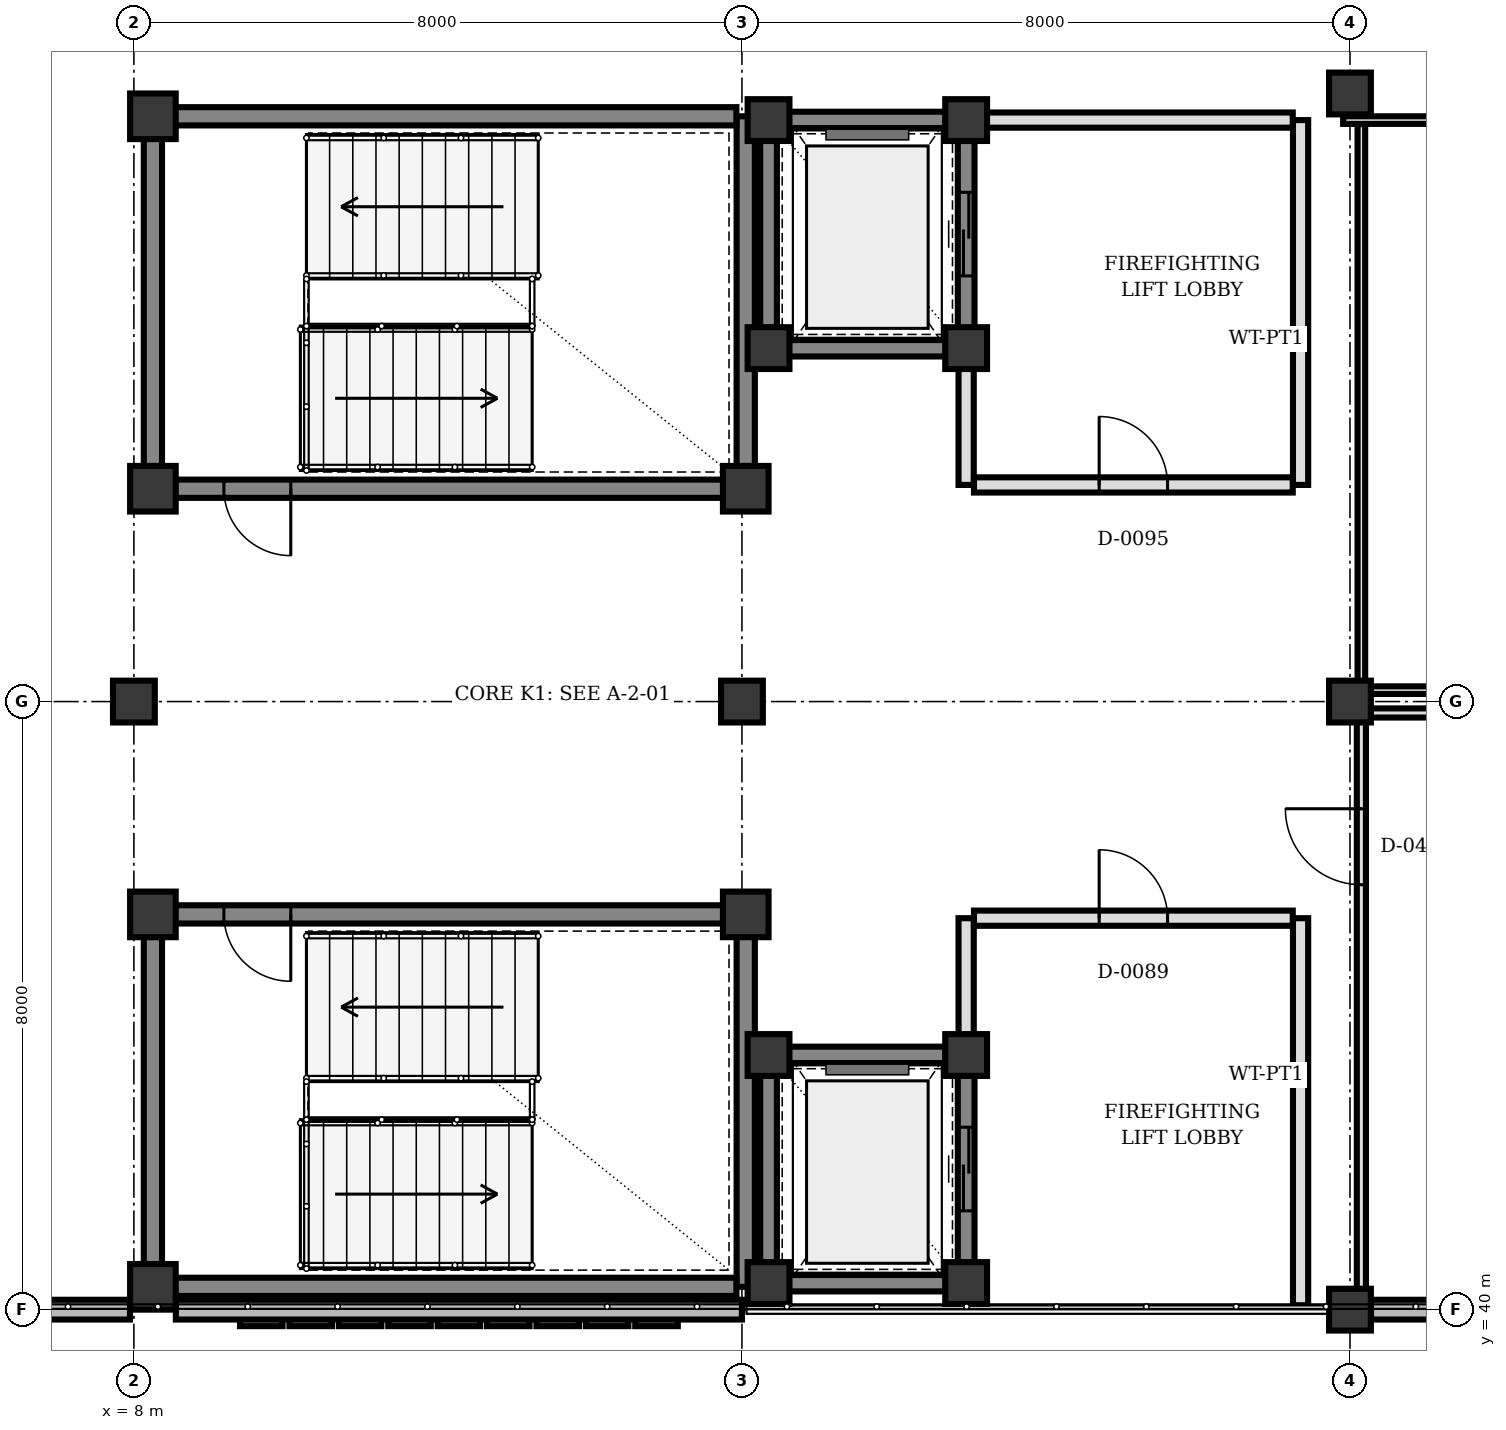
"""IFC4 building model, lengths in metres.
Left out: names, types, materials, properties, quantities, classifications, styles, units other than length and angle.
Written with IfcOpenShell. Run it as: python <this file> out.ifc"""

import sys

from ifc_helpers import new_model, si_unit, direction, frame, frame_2d, origin, origin_2d, place, context, subcontext, project, spatial, rectangle, extrude, element, fill, save


model = new_model("IFC4")
c1 = context("Model", 3, precision=1e-05, world=origin(), true_north=direction((0.0, 1.0)))
c2 = subcontext(c1, "Body", "Model", "MODEL_VIEW")
j1 = project(units=[si_unit("LENGTHUNIT", "METRE"), si_unit("PLANEANGLEUNIT", "RADIAN")], contexts=[c1])
p1 = place(None, origin())
s1 = spatial("IfcSite", under=j1, at=p1, CompositionType="ELEMENT")
p2 = place(p1, origin())
s2 = spatial("IfcBuilding", under=s1, at=p2, CompositionType="ELEMENT")
p3 = place(p2, frame((0.0, 0.0, 16.5)))
s3 = spatial("IfcBuildingStorey", under=s2, at=p3, CompositionType="ELEMENT", Elevation=16.5)
for number, where, z_axis, x_axis in (
    (1, (8.25, 40.3, 0.0), (0.0, 0.0, 1.0), (1.0, 0.0, 0.0)),
    (2, (16.05, 45.2, 0.0), (0.0, 0.0, 1.0), (1.0, 0.0, 0.0)),
    (3, (8.25, 45.2, 0.0), (0.0, 0.0, 1.0), (1.0, 0.0, 0.0)),
    (4, (8.25, 50.8, 0.0), (0.0, 0.0, 1.0), (1.0, 0.0, 0.0)),
    (5, (16.05, 50.8, 0.0), (0.0, 0.0, 1.0), (1.0, 0.0, 0.0)),
    (6, (8.25, 55.7, 0.0), (0.0, 0.0, 1.0), (1.0, 0.0, 0.0)),
):
    element("IfcColumn", number, at=place(p3, frame(where, z_axis=z_axis, x_axis=x_axis)), inside=s3, PredefinedType="COLUMN", context=c2, shape_type="SweptSolid", body=[
        extrude(rectangle(XDim=0.6, YDim=0.6, at=origin_2d()), origin(), (0.0, 0.0, 1.0), 4.0),
    ])
for number, where, z_axis, x_axis in (
    (7, (16.35, 40.35, 0.0), (0.0, 0.0, 1.0), (1.0, 0.0, 0.0)),
    (8, (18.95, 40.35, 0.0), (0.0, 0.0, 1.0), (1.0, 0.0, 0.0)),
    (9, (18.95, 43.35, 0.0), (0.0, 0.0, 1.0), (1.0, 0.0, 0.0)),
    (10, (16.35, 43.35, 0.0), (0.0, 0.0, 1.0), (1.0, 0.0, 0.0)),
    (11, (16.35, 52.65, 0.0), (0.0, 0.0, 1.0), (1.0, 0.0, 0.0)),
    (12, (18.95, 52.65, 0.0), (0.0, 0.0, 1.0), (1.0, 0.0, 0.0)),
    (13, (18.95, 55.65, 0.0), (0.0, 0.0, 1.0), (1.0, 0.0, 0.0)),
    (14, (16.35, 55.65, 0.0), (0.0, 0.0, 1.0), (1.0, 0.0, 0.0)),
    (15, (16.0, 48.0, 0.0), (0.0, 0.0, 1.0), (1.0, 0.0, 0.0)),
    (16, (24.0, 40.0, 0.0), (0.0, 0.0, 1.0), (1.0, 0.0, 0.0)),
    (17, (24.0, 48.0, 0.0), (0.0, 0.0, 1.0), (1.0, 0.0, 0.0)),
    (18, (24.0, 56.0, 0.0), (0.0, 0.0, 1.0), (1.0, 0.0, 0.0)),
    (19, (8.0, 48.0, 0.0), (0.0, 0.0, 1.0), (1.0, 0.0, 0.0)),
):
    element("IfcColumn", number, at=place(p3, frame(where, z_axis=z_axis, x_axis=x_axis)), inside=s3, PredefinedType="COLUMN", context=c2, shape_type="SweptSolid", body=[
        extrude(rectangle(XDim=0.55, YDim=0.55, at=origin_2d()), origin(), (0.0, 0.0, 1.0), 4.0),
    ])
p4 = place(p3, frame((31.723, 40.0, 0.0), z_axis=(0.0, 0.0, 1.0), x_axis=(-1.0, 0.0, 0.0)))
e20 = element("IfcWall", 20, at=p4, inside=s3, PredefinedType="SOLIDWALL", context=c2, shape_type="SweptSolid", body=[
    extrude(rectangle(XDim=7.446, YDim=0.26, at=frame_2d((3.723, 0.0))), origin(), (0.0, 0.0, 1.0), 3.068),
])
p5 = place(p4, frame((4.911, 0.0, 0.9)))
e21 = element("IfcOpeningElement", 21, at=p5, cuts=e20, PredefinedType="OPENING", context=c2, shape_type="SweptSolid", body=[
    extrude(rectangle(XDim=0.9, YDim=1.4, at=frame_2d((0.45, 0.7))), frame((0.0, 0.14, 0.0), z_axis=(0.0, -1.0, 0.0), x_axis=(1.0, 0.0, 0.0)), (0.0, 0.0, 1.0), 0.28),
])
p6 = place(p3, frame((16.0, 40.0, 0.0), z_axis=(0.0, 0.0, 1.0), x_axis=(-1.0, 0.0, 0.0)))
e22 = element("IfcWall", 22, at=p6, inside=s3, PredefinedType="SOLIDWALL", context=c2, shape_type="SweptSolid", body=[
    extrude(rectangle(XDim=7.448, YDim=0.26, at=frame_2d((3.724, 0.0))), origin(), (0.0, 0.0, 1.0), 3.55),
])
p7 = place(p3, frame((7.948, 40.0, 0.0), z_axis=(0.0, 0.0, 1.0), x_axis=(-1.0, 0.0, 0.0)))
e23 = element("IfcWall", 23, at=p7, inside=s3, PredefinedType="SOLIDWALL", context=c2, shape_type="SweptSolid", body=[
    extrude(rectangle(XDim=7.671, YDim=0.26, at=frame_2d((3.835, 0.0))), origin(), (0.0, 0.0, 1.0), 3.55),
])
p8 = place(p7, frame((1.351, 0.0, 0.9)))
e24 = element("IfcOpeningElement", 24, at=p8, cuts=e23, PredefinedType="OPENING", context=c2, shape_type="SweptSolid", body=[
    extrude(rectangle(XDim=1.9, YDim=1.1, at=frame_2d((0.95, 0.55))), frame((0.0, 0.14, 0.0), z_axis=(0.0, -1.0, 0.0), x_axis=(1.0, 0.0, 0.0)), (0.0, 0.0, 1.0), 0.28),
])
p9 = place(p3, frame((8.25, 40.592, 0.0), z_axis=(0.0, 0.0, 1.0), x_axis=(0.0, 1.0, 0.0)))
e25 = element("IfcWall", 25, at=p9, inside=s3, PredefinedType="SHEAR", context=c2, shape_type="SweptSolid", body=[
    extrude(rectangle(XDim=4.316, YDim=0.24, at=frame_2d((2.158, 0.0))), origin(), (0.0, 0.0, 1.0), 3.74),
])
p10 = place(p3, frame((16.05, 44.908, 0.0), z_axis=(0.0, 0.0, 1.0), x_axis=(0.0, -1.0, 0.0)))
e26 = element("IfcWall", 26, at=p10, inside=s3, PredefinedType="SHEAR", context=c2, shape_type="SweptSolid", body=[
    extrude(rectangle(XDim=4.608, YDim=0.24, at=frame_2d((2.304, 0.0))), origin(), (0.0, 0.0, 1.0), 3.74),
])
p11 = place(p3, frame((15.927, 40.3, 0.0), z_axis=(0.0, 0.0, 1.0), x_axis=(-1.0, 0.0, 0.0)))
e27 = element("IfcWall", 27, at=p11, inside=s3, PredefinedType="SHEAR", context=c2, shape_type="SweptSolid", body=[
    extrude(rectangle(XDim=7.385, YDim=0.24, at=frame_2d((3.692, 0.0))), origin(), (0.0, 0.0, 1.0), 3.74),
])
p12 = place(p3, frame((15.758, 45.2, 0.0), z_axis=(0.0, 0.0, 1.0), x_axis=(-1.0, 0.0, 0.0)))
e28 = element("IfcWall", 28, at=p12, inside=s3, PredefinedType="SHEAR", context=c2, shape_type="SweptSolid", body=[
    extrude(rectangle(XDim=7.216, YDim=0.24, at=frame_2d((3.608, 0.0))), origin(), (0.0, 0.0, 1.0), 3.74),
])
p13 = place(p12, frame((5.694, 0.0, 0.0)))
e29 = element("IfcOpeningElement", 29, at=p13, cuts=e28, PredefinedType="OPENING", context=c2, shape_type="SweptSolid", body=[
    extrude(rectangle(XDim=0.88, YDim=2.1, at=frame_2d((0.44, 1.05))), frame((0.0, 0.13, 0.0), z_axis=(0.0, -1.0, 0.0), x_axis=(1.0, 0.0, 0.0)), (0.0, 0.0, 1.0), 0.26),
])
p14 = place(p3, frame((8.25, 51.092, 0.0), z_axis=(0.0, 0.0, 1.0), x_axis=(0.0, 1.0, 0.0)))
e30 = element("IfcWall", 30, at=p14, inside=s3, PredefinedType="SHEAR", context=c2, shape_type="SweptSolid", body=[
    extrude(rectangle(XDim=4.316, YDim=0.24, at=frame_2d((2.158, 0.0))), origin(), (0.0, 0.0, 1.0), 3.74),
])
p15 = place(p3, frame((16.05, 55.7, 0.0), z_axis=(0.0, 0.0, 1.0), x_axis=(0.0, -1.0, 0.0)))
e31 = element("IfcWall", 31, at=p15, inside=s3, PredefinedType="SHEAR", context=c2, shape_type="SweptSolid", body=[
    extrude(rectangle(XDim=4.608, YDim=0.24, at=frame_2d((2.304, 0.0))), origin(), (0.0, 0.0, 1.0), 3.74),
])
p16 = place(p3, frame((15.758, 50.8, 0.0), z_axis=(0.0, 0.0, 1.0), x_axis=(-1.0, 0.0, 0.0)))
e32 = element("IfcWall", 32, at=p16, inside=s3, PredefinedType="SHEAR", context=c2, shape_type="SweptSolid", body=[
    extrude(rectangle(XDim=7.216, YDim=0.24, at=frame_2d((3.608, 0.0))), origin(), (0.0, 0.0, 1.0), 3.74),
])
p17 = place(p16, frame((5.694, 0.0, 0.0)))
e33 = element("IfcOpeningElement", 33, at=p17, cuts=e32, PredefinedType="OPENING", context=c2, shape_type="SweptSolid", body=[
    extrude(rectangle(XDim=0.88, YDim=2.1, at=frame_2d((0.44, 1.05))), frame((0.0, 0.13, 0.0), z_axis=(0.0, -1.0, 0.0), x_axis=(1.0, 0.0, 0.0)), (0.0, 0.0, 1.0), 0.26),
])
p18 = place(p3, frame((15.927, 55.7, 0.0), z_axis=(0.0, 0.0, 1.0), x_axis=(-1.0, 0.0, 0.0)))
e34 = element("IfcWall", 34, at=p18, inside=s3, PredefinedType="SHEAR", context=c2, shape_type="SweptSolid", body=[
    extrude(rectangle(XDim=7.385, YDim=0.24, at=frame_2d((3.692, 0.0))), origin(), (0.0, 0.0, 1.0), 3.74),
])
p19 = place(p3, frame((16.617, 40.35, 0.0), z_axis=(0.0, 0.0, 1.0), x_axis=(1.0, 0.0, 0.0)))
e35 = element("IfcWall", 35, at=p19, inside=s3, PredefinedType="SHEAR", context=c2, shape_type="SweptSolid", body=[
    extrude(rectangle(XDim=2.066, YDim=0.22, at=frame_2d((1.033, 0.0))), origin(), (0.0, 0.0, 1.0), 3.74),
])
p20 = place(p3, frame((18.95, 40.617, 0.0), z_axis=(0.0, 0.0, 1.0), x_axis=(0.0, 1.0, 0.0)))
e36 = element("IfcWall", 36, at=p20, inside=s3, PredefinedType="SHEAR", context=c2, shape_type="SweptSolid", body=[
    extrude(rectangle(XDim=2.466, YDim=0.22, at=frame_2d((1.233, 0.0))), origin(), (0.0, 0.0, 1.0), 3.74),
])
p21 = place(p20, frame((0.683, 0.0, 0.0)))
e37 = element("IfcOpeningElement", 37, at=p21, cuts=e36, PredefinedType="OPENING", context=c2, shape_type="SweptSolid", body=[
    extrude(rectangle(XDim=1.1, YDim=2.15, at=frame_2d((0.55, 1.075))), frame((0.0, 0.12, 0.0), z_axis=(0.0, -1.0, 0.0), x_axis=(1.0, 0.0, 0.0)), (0.0, 0.0, 1.0), 0.24),
])
p22 = place(p3, frame((18.683, 43.35, 0.0), z_axis=(0.0, 0.0, 1.0), x_axis=(-1.0, 0.0, 0.0)))
e38 = element("IfcWall", 38, at=p22, inside=s3, PredefinedType="SHEAR", context=c2, shape_type="SweptSolid", body=[
    extrude(rectangle(XDim=2.066, YDim=0.22, at=frame_2d((1.033, 0.0))), origin(), (0.0, 0.0, 1.0), 3.74),
])
p23 = place(p3, frame((16.35, 43.083, 0.0), z_axis=(0.0, 0.0, 1.0), x_axis=(0.0, -1.0, 0.0)))
e39 = element("IfcWall", 39, at=p23, inside=s3, PredefinedType="SHEAR", context=c2, shape_type="SweptSolid", body=[
    extrude(rectangle(XDim=2.466, YDim=0.22, at=frame_2d((1.233, 0.0))), origin(), (0.0, 0.0, 1.0), 3.74),
])
p24 = place(p3, frame((18.95, 43.617, 0.0), z_axis=(0.0, 0.0, 1.0), x_axis=(0.0, 1.0, 0.0)))
e40 = element("IfcWall", 40, at=p24, inside=s3, PredefinedType="PARTITIONING", context=c2, shape_type="SweptSolid", body=[
    extrude(rectangle(XDim=1.533, YDim=0.2, at=frame_2d((0.767, 0.0))), origin(), (0.0, 0.0, 1.0), 3.7),
])
p25 = place(p3, frame((23.35, 40.058, 0.0), z_axis=(0.0, 0.0, 1.0), x_axis=(0.0, 1.0, 0.0)))
e41 = element("IfcWall", 41, at=p25, inside=s3, PredefinedType="PARTITIONING", context=c2, shape_type="SweptSolid", body=[
    extrude(rectangle(XDim=5.092, YDim=0.2, at=frame_2d((2.546, 0.0))), origin(), (0.0, 0.0, 1.0), 3.7),
])
p26 = place(p3, frame((19.053, 45.15, 0.0), z_axis=(0.0, 0.0, 1.0), x_axis=(1.0, 0.0, 0.0)))
e42 = element("IfcWall", 42, at=p26, inside=s3, PredefinedType="PARTITIONING", context=c2, shape_type="SweptSolid", body=[
    extrude(rectangle(XDim=4.194, YDim=0.2, at=frame_2d((2.097, 0.0))), origin(), (0.0, 0.0, 1.0), 3.7),
])
p27 = place(p26, frame((1.647, 0.0, 0.0)))
e43 = element("IfcOpeningElement", 43, at=p27, cuts=e42, PredefinedType="OPENING", context=c2, shape_type="SweptSolid", body=[
    extrude(rectangle(XDim=0.9, YDim=2.2, at=frame_2d((0.45, 1.1))), frame((0.0, 0.11, 0.0), z_axis=(0.0, -1.0, 0.0), x_axis=(1.0, 0.0, 0.0)), (0.0, 0.0, 1.0), 0.22),
])
p28 = place(p3, frame((16.617, 52.65, 0.0), z_axis=(0.0, 0.0, 1.0), x_axis=(1.0, 0.0, 0.0)))
e44 = element("IfcWall", 44, at=p28, inside=s3, PredefinedType="SHEAR", context=c2, shape_type="SweptSolid", body=[
    extrude(rectangle(XDim=2.066, YDim=0.22, at=frame_2d((1.033, 0.0))), origin(), (0.0, 0.0, 1.0), 3.74),
])
p29 = place(p3, frame((18.95, 52.917, 0.0), z_axis=(0.0, 0.0, 1.0), x_axis=(0.0, 1.0, 0.0)))
e45 = element("IfcWall", 45, at=p29, inside=s3, PredefinedType="SHEAR", context=c2, shape_type="SweptSolid", body=[
    extrude(rectangle(XDim=2.466, YDim=0.22, at=frame_2d((1.233, 0.0))), origin(), (0.0, 0.0, 1.0), 3.74),
])
p30 = place(p29, frame((0.683, 0.0, 0.0)))
e46 = element("IfcOpeningElement", 46, at=p30, cuts=e45, PredefinedType="OPENING", context=c2, shape_type="SweptSolid", body=[
    extrude(rectangle(XDim=1.1, YDim=2.15, at=frame_2d((0.55, 1.075))), frame((0.0, 0.12, 0.0), z_axis=(0.0, -1.0, 0.0), x_axis=(1.0, 0.0, 0.0)), (0.0, 0.0, 1.0), 0.24),
])
p31 = place(p3, frame((18.683, 55.65, 0.0), z_axis=(0.0, 0.0, 1.0), x_axis=(-1.0, 0.0, 0.0)))
e47 = element("IfcWall", 47, at=p31, inside=s3, PredefinedType="SHEAR", context=c2, shape_type="SweptSolid", body=[
    extrude(rectangle(XDim=2.066, YDim=0.22, at=frame_2d((1.033, 0.0))), origin(), (0.0, 0.0, 1.0), 3.74),
])
p32 = place(p3, frame((16.35, 55.383, 0.0), z_axis=(0.0, 0.0, 1.0), x_axis=(0.0, -1.0, 0.0)))
e48 = element("IfcWall", 48, at=p32, inside=s3, PredefinedType="SHEAR", context=c2, shape_type="SweptSolid", body=[
    extrude(rectangle(XDim=2.466, YDim=0.22, at=frame_2d((1.233, 0.0))), origin(), (0.0, 0.0, 1.0), 3.74),
])
p33 = place(p3, frame((18.95, 50.85, 0.0), z_axis=(0.0, 0.0, 1.0), x_axis=(0.0, 1.0, 0.0)))
e49 = element("IfcWall", 49, at=p33, inside=s3, PredefinedType="PARTITIONING", context=c2, shape_type="SweptSolid", body=[
    extrude(rectangle(XDim=1.533, YDim=0.2, at=frame_2d((0.767, 0.0))), origin(), (0.0, 0.0, 1.0), 3.7),
])
p34 = place(p3, frame((23.35, 50.85, 0.0), z_axis=(0.0, 0.0, 1.0), x_axis=(0.0, 1.0, 0.0)))
e50 = element("IfcWall", 50, at=p34, inside=s3, PredefinedType="PARTITIONING", context=c2, shape_type="SweptSolid", body=[
    extrude(rectangle(XDim=4.8, YDim=0.2, at=frame_2d((2.4, 0.0))), origin(), (0.0, 0.0, 1.0), 3.7),
])
p35 = place(p3, frame((19.217, 55.65, 0.0), z_axis=(0.0, 0.0, 1.0), x_axis=(1.0, 0.0, 0.0)))
e51 = element("IfcWall", 51, at=p35, inside=s3, PredefinedType="PARTITIONING", context=c2, shape_type="SweptSolid", body=[
    extrude(rectangle(XDim=4.03, YDim=0.2, at=frame_2d((2.015, 0.0))), origin(), (0.0, 0.0, 1.0), 3.7),
])
p36 = place(p3, frame((19.053, 50.85, 0.0), z_axis=(0.0, 0.0, 1.0), x_axis=(1.0, 0.0, 0.0)))
e52 = element("IfcWall", 52, at=p36, inside=s3, PredefinedType="PARTITIONING", context=c2, shape_type="SweptSolid", body=[
    extrude(rectangle(XDim=4.194, YDim=0.2, at=frame_2d((2.097, 0.0))), origin(), (0.0, 0.0, 1.0), 3.7),
])
p37 = place(p36, frame((1.647, 0.0, 0.0)))
e53 = element("IfcOpeningElement", 53, at=p37, cuts=e52, PredefinedType="OPENING", context=c2, shape_type="SweptSolid", body=[
    extrude(rectangle(XDim=0.9, YDim=2.2, at=frame_2d((0.45, 1.1))), frame((0.0, 0.11, 0.0), z_axis=(0.0, -1.0, 0.0), x_axis=(1.0, 0.0, 0.0)), (0.0, 0.0, 1.0), 0.22),
])
p38 = place(p3, frame((24.267, 47.85, 0.0), z_axis=(0.0, 0.0, 1.0), x_axis=(1.0, 0.0, 0.0)))
e54 = element("IfcWall", 54, at=p38, inside=s3, PredefinedType="PARTITIONING", context=c2, shape_type="SweptSolid", body=[
    extrude(rectangle(XDim=7.6, YDim=0.12, at=frame_2d((3.8, 0.0))), origin(), (0.0, 0.0, 1.0), 3.149),
])
p39 = place(p3, frame((24.15, 40.267, 0.0), z_axis=(0.0, 0.0, 1.0), x_axis=(0.0, 1.0, 0.0)))
e55 = element("IfcWall", 55, at=p39, inside=s3, PredefinedType="PARTITIONING", context=c2, shape_type="SweptSolid", body=[
    extrude(rectangle(XDim=7.466, YDim=0.12, at=frame_2d((3.733, 0.0))), origin(), (0.0, 0.0, 1.0), 3.068),
])
p40 = place(p39, frame((5.323, 0.0, 0.0)))
e56 = element("IfcOpeningElement", 56, at=p40, cuts=e55, PredefinedType="OPENING", context=c2, shape_type="SweptSolid", body=[
    extrude(rectangle(XDim=1.0, YDim=2.1, at=frame_2d((0.5, 1.05))), frame((0.0, 0.07, 0.0), z_axis=(0.0, -1.0, 0.0), x_axis=(1.0, 0.0, 0.0)), (0.0, 0.0, 1.0), 0.14),
])
p41 = place(p3, frame((23.91, 55.65, 0.0), z_axis=(0.0, 0.0, 1.0), x_axis=(1.0, 0.0, 0.0)))
e57 = element("IfcWall", 57, at=p41, inside=s3, PredefinedType="PARTITIONING", context=c2, shape_type="SweptSolid", body=[
    extrude(rectangle(XDim=7.957, YDim=0.1, at=frame_2d((3.979, 0.0))), origin(), (0.0, 0.0, 1.0), 3.223),
])
p42 = place(p41, frame((3.454, 0.0, 0.0)))
e58 = element("IfcOpeningElement", 58, at=p42, cuts=e57, PredefinedType="OPENING", context=c2, shape_type="SweptSolid", body=[
    extrude(rectangle(XDim=1.05, YDim=2.1, at=frame_2d((0.525, 1.05))), frame((0.0, 0.06, 0.0), z_axis=(0.0, -1.0, 0.0), x_axis=(1.0, 0.0, 0.0)), (0.0, 0.0, 1.0), 0.12),
])
p43 = place(p3, frame((31.867, 48.15, 0.0), z_axis=(0.0, 0.0, 1.0), x_axis=(-1.0, 0.0, 0.0)))
e59 = element("IfcWall", 59, at=p43, inside=s3, PredefinedType="PARTITIONING", context=c2, shape_type="SweptSolid", body=[
    extrude(rectangle(XDim=7.6, YDim=0.1, at=frame_2d((3.8, 0.0))), origin(), (0.0, 0.0, 1.0), 3.149),
])
p44 = place(p3, frame((24.15, 48.267, 0.0), z_axis=(0.0, 0.0, 1.0), x_axis=(0.0, 1.0, 0.0)))
e60 = element("IfcWall", 60, at=p44, inside=s3, PredefinedType="PARTITIONING", context=c2, shape_type="SweptSolid", body=[
    extrude(rectangle(XDim=7.33, YDim=0.1, at=frame_2d((3.665, 0.0))), origin(), (0.0, 0.0, 1.0), 3.223),
])
p45 = place(p13, origin())
e61 = element("IfcDoor", 61, at=p45, inside=s3, OperationType="SINGLE_SWING_LEFT", PredefinedType="DOOR", context=c2, shape_type="SweptSolid", body=[
    extrude(rectangle(XDim=0.88, YDim=2.1, at=frame_2d((0.44, 1.05))), frame((0.0, 0.025, 0.0), z_axis=(0.0, -1.0, 0.0), x_axis=(1.0, 0.0, 0.0)), (0.0, 0.0, 1.0), 0.05),
])
fill(e29, e61)
p46 = place(p17, origin())
e62 = element("IfcDoor", 62, at=p46, inside=s3, OperationType="SINGLE_SWING_LEFT", PredefinedType="DOOR", context=c2, shape_type="SweptSolid", body=[
    extrude(rectangle(XDim=0.88, YDim=2.1, at=frame_2d((0.44, 1.05))), frame((0.0, 0.025, 0.0), z_axis=(0.0, -1.0, 0.0), x_axis=(1.0, 0.0, 0.0)), (0.0, 0.0, 1.0), 0.05),
])
fill(e33, e62)
p47 = place(p21, origin())
e63 = element("IfcDoor", 63, at=p47, inside=s3, OperationType="DOUBLE_DOOR_SLIDING", PredefinedType="DOOR", context=c2, shape_type="SweptSolid", body=[
    extrude(rectangle(XDim=1.1, YDim=2.15, at=frame_2d((0.55, 1.075))), frame((0.0, 0.025, 0.0), z_axis=(0.0, -1.0, 0.0), x_axis=(1.0, 0.0, 0.0)), (0.0, 0.0, 1.0), 0.05),
])
fill(e37, e63)
p48 = place(p27, origin())
e64 = element("IfcDoor", 64, at=p48, inside=s3, OperationType="SINGLE_SWING_LEFT", PredefinedType="DOOR", context=c2, shape_type="SweptSolid", body=[
    extrude(rectangle(XDim=0.9, YDim=2.2, at=frame_2d((0.45, 1.1))), frame((0.0, 0.025, 0.0), z_axis=(0.0, -1.0, 0.0), x_axis=(1.0, 0.0, 0.0)), (0.0, 0.0, 1.0), 0.05),
])
fill(e43, e64)
p49 = place(p30, origin())
e65 = element("IfcDoor", 65, at=p49, inside=s3, OperationType="DOUBLE_DOOR_SLIDING", PredefinedType="DOOR", context=c2, shape_type="SweptSolid", body=[
    extrude(rectangle(XDim=1.1, YDim=2.15, at=frame_2d((0.55, 1.075))), frame((0.0, 0.025, 0.0), z_axis=(0.0, -1.0, 0.0), x_axis=(1.0, 0.0, 0.0)), (0.0, 0.0, 1.0), 0.05),
])
fill(e46, e65)
p50 = place(p37, origin())
e66 = element("IfcDoor", 66, at=p50, inside=s3, OperationType="SINGLE_SWING_LEFT", PredefinedType="DOOR", context=c2, shape_type="SweptSolid", body=[
    extrude(rectangle(XDim=0.9, YDim=2.2, at=frame_2d((0.45, 1.1))), frame((0.0, 0.025, 0.0), z_axis=(0.0, -1.0, 0.0), x_axis=(1.0, 0.0, 0.0)), (0.0, 0.0, 1.0), 0.05),
])
fill(e53, e66)
p51 = place(p40, origin())
e67 = element("IfcDoor", 67, at=p51, inside=s3, OperationType="SINGLE_SWING_RIGHT", PredefinedType="DOOR", context=c2, shape_type="SweptSolid", body=[
    extrude(rectangle(XDim=1.0, YDim=2.1, at=frame_2d((0.5, 1.05))), frame((0.0, 0.025, 0.0), z_axis=(0.0, -1.0, 0.0), x_axis=(1.0, 0.0, 0.0)), (0.0, 0.0, 1.0), 0.05),
])
fill(e56, e67)
save(model, sys.argv[1])
